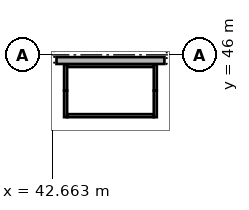
"""IFC4 building model, lengths in metres.
Left out: names, types, materials, properties, quantities, classifications, styles, units other than length and angle.
Written with IfcOpenShell. Run it as: python <this file> out.ifc"""

import sys

from ifc_helpers import new_model, si_unit, direction, frame, frame_2d, origin, origin_2d, place, context, subcontext, project, spatial, rectangle, extrude, element, fill, save


model = new_model("IFC4")
c1 = context("Model", 3, precision=1e-05, world=origin(), true_north=direction((0.0, 1.0)))
c2 = subcontext(c1, "Body", "Model", "MODEL_VIEW")
j1 = project(units=[si_unit("LENGTHUNIT", "METRE"), si_unit("PLANEANGLEUNIT", "RADIAN")], contexts=[c1])
p1 = place(None, origin())
s1 = spatial("IfcSite", under=j1, at=p1, CompositionType="ELEMENT")
p2 = place(p1, origin())
s2 = spatial("IfcBuilding", under=s1, at=p2, CompositionType="ELEMENT")
p3 = place(p2, origin())
s3 = spatial("IfcBuildingStorey", under=s2, at=p3, CompositionType="ELEMENT", Elevation=0.0)
for number, where, z_axis, x_axis in (
    (1, (42.0, 46.0, 0.0), (0.0, 0.0, 1.0), (1.0, 0.0, 0.0)),
    (2, (51.0, 46.0, 0.0), (0.0, 0.0, 1.0), (1.0, 0.0, 0.0)),
):
    element("IfcColumn", number, at=place(p3, frame(where, z_axis=z_axis, x_axis=x_axis)), inside=s3, PredefinedType="COLUMN", context=c2, shape_type="SweptSolid", body=[
        extrude(rectangle(XDim=1.6, YDim=1.2, at=origin_2d()), origin(), (0.0, 0.0, 1.0), 5.0),
    ])
p4 = place(p3, frame((50.5, 44.9, -0.3), z_axis=(0.0, 0.0, 1.0), x_axis=(1.0, 0.0, 0.0)))
e3 = element("IfcColumn", 3, at=p4, inside=s3, PredefinedType="COLUMN", context=c2, shape_type="SweptSolid", body=[
    extrude(rectangle(XDim=0.8, YDim=1.0, at=origin_2d()), origin(), (0.0, 0.0, 1.0), 5.3),
])
for number, where, z_axis, x_axis in (
    (4, (43.55, 45.4, 0.0), (0.0, 0.0, 1.0), (0.0, -1.0, 0.0)),
    (5, (43.55, 43.65, 0.0), (0.0, 0.0, 1.0), (0.0, -1.0, 0.0)),
    (6, (49.45, 45.4, 0.0), (0.0, 0.0, 1.0), (0.0, -1.0, 0.0)),
    (7, (49.45, 43.65, 0.0), (0.0, 0.0, 1.0), (0.0, -1.0, 0.0)),
):
    element("IfcWall", number, at=place(p3, frame(where, z_axis=z_axis, x_axis=x_axis)), inside=s3, PredefinedType="SOLIDWALL", context=c2, shape_type="SweptSolid", body=[
        extrude(rectangle(XDim=1.75, YDim=0.2, at=frame_2d((0.875, 0.0))), origin(), (0.0, 0.0, 1.0), 3.2),
    ])
p5 = place(p3, frame((43.65, 42.0, 0.0), z_axis=(0.0, 0.0, 1.0), x_axis=(1.0, 0.0, 0.0)))
e8 = element("IfcWall", 8, at=p5, inside=s3, PredefinedType="SOLIDWALL", context=c2, shape_type="SweptSolid", body=[
    extrude(rectangle(XDim=5.7, YDim=0.2, at=frame_2d((2.85, 0.0))), origin(), (0.0, 0.0, 1.0), 3.2),
])
p6 = place(p5, frame((0.2, 0.0, 0.0)))
e9 = element("IfcOpeningElement", 9, at=p6, cuts=e8, PredefinedType="OPENING", context=c2, shape_type="SweptSolid", body=[
    extrude(rectangle(XDim=1.1, YDim=2.1, at=frame_2d((0.55, 1.05))), frame((0.0, 0.11, 0.0), z_axis=(0.0, -1.0, 0.0), x_axis=(1.0, 0.0, 0.0)), (0.0, 0.0, 1.0), 0.22),
])
p7 = place(p3, frame((43.65, 45.3, 0.0), z_axis=(0.0, 0.0, 1.0), x_axis=(1.0, 0.0, 0.0)))
e10 = element("IfcWall", 10, at=p7, inside=s3, PredefinedType="SOLIDWALL", context=c2, shape_type="SweptSolid", body=[
    extrude(rectangle(XDim=5.7, YDim=0.2, at=frame_2d((2.85, 0.0))), origin(), (0.0, 0.0, 1.0), 3.2),
])
p8 = place(p3, frame((42.95, 45.625, 0.0), z_axis=(0.0, 0.0, 1.0), x_axis=(1.0, 0.0, 0.0)))
e11 = element("IfcWall", 11, at=p8, inside=s3, PredefinedType="SOLIDWALL", context=c2, shape_type="SweptSolid", body=[
    extrude(rectangle(XDim=7.1, YDim=0.45, at=frame_2d((3.55, 0.0))), origin(), (0.0, 0.0, 1.0), 5.0),
])
p9 = place(p6, frame((1.1, 0.0, 0.0), z_axis=(0.0, 0.0, 1.0), x_axis=(-1.0, 0.0, 0.0)))
e12 = element("IfcDoor", 12, at=p9, inside=s3, OperationType="SINGLE_SWING_LEFT", PredefinedType="DOOR", context=c2, shape_type="SweptSolid", body=[
    extrude(rectangle(XDim=1.1, YDim=2.1, at=frame_2d((0.55, 1.05))), frame((0.0, 0.025, 0.0), z_axis=(0.0, -1.0, 0.0), x_axis=(1.0, 0.0, 0.0)), (0.0, 0.0, 1.0), 0.05),
])
fill(e9, e12)
save(model, sys.argv[1])
